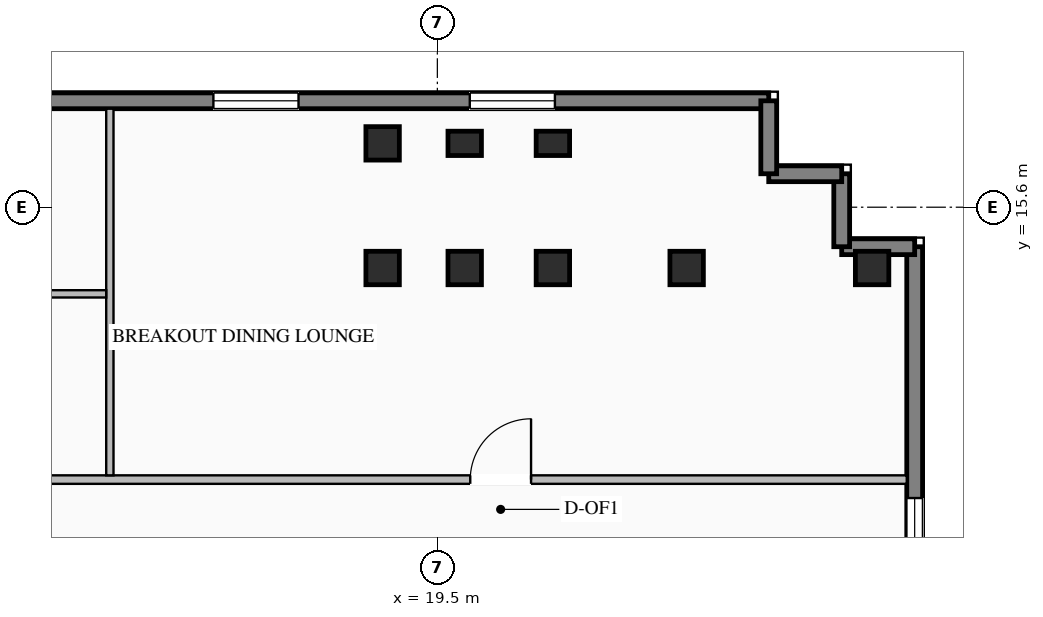
"""IFC4 building model, lengths in metres.
Left out: names, types, materials, properties, quantities, classifications, styles, units other than length and angle.
Written with IfcOpenShell. Run it as: python <this file> out.ifc"""

import sys

from ifc_helpers import new_model, si_unit, direction, frame, frame_2d, origin, origin_2d, place, context, subcontext, project, spatial, rectangle, i_section, extrude, element, fill, save


model = new_model("IFC4")
c1 = context("Model", 3, precision=1e-05, world=origin(), true_north=direction((0.0, 1.0)))
c2 = subcontext(c1, "Body", "Model", "MODEL_VIEW")
j1 = project(units=[si_unit("LENGTHUNIT", "METRE"), si_unit("PLANEANGLEUNIT", "RADIAN")], contexts=[c1])
p1 = place(None, origin())
s1 = spatial("IfcSite", under=j1, at=p1, CompositionType="ELEMENT")
p2 = place(p1, origin())
s2 = spatial("IfcBuilding", under=s1, at=p2, CompositionType="ELEMENT")
p3 = place(p2, frame((0.0, 0.0, 229.2)))
s3 = spatial("IfcBuildingStorey", under=s2, at=p3, CompositionType="ELEMENT", Elevation=229.2)
for number, where, z_axis, x_axis in (
    (1, (18.6, 14.6, 0.0), (0.0, 0.0, 1.0), (1.0, 0.0, 0.0)),
    (2, (19.95, 14.6, 0.0), (0.0, 0.0, 1.0), (1.0, 0.0, 0.0)),
    (3, (21.4, 14.6, 0.0), (0.0, 0.0, 1.0), (1.0, 0.0, 0.0)),
    (4, (23.6, 14.6, 0.0), (0.0, 0.0, 1.0), (1.0, 0.0, 0.0)),
    (5, (18.6, 16.65, 0.0), (0.0, 0.0, 1.0), (1.0, 0.0, 0.0)),
    (6, (26.65, 14.6, 0.0), (0.0, 0.0, 1.0), (1.0, 0.0, 0.0)),
):
    element("IfcColumn", number, at=place(p3, frame(where, z_axis=z_axis, x_axis=x_axis)), inside=s3, PredefinedType="COLUMN", context=c2, shape_type="SweptSolid", body=[
        extrude(i_section(OverallWidth=0.55, OverallDepth=0.55, WebThickness=0.024, FlangeThickness=0.036, at=origin_2d()), origin(), (0.0, 0.0, 1.0), 3.45),
    ])
for number, where, z_axis, x_axis in (
    (7, (19.95, 16.65, 0.0), (0.0, 0.0, 1.0), (1.0, 0.0, 0.0)),
    (8, (21.4, 16.65, 0.0), (0.0, 0.0, 1.0), (1.0, 0.0, 0.0)),
):
    element("IfcColumn", number, at=place(p3, frame(where, z_axis=z_axis, x_axis=x_axis)), inside=s3, PredefinedType="PILASTER", context=c2, shape_type="SweptSolid", body=[
        extrude(rectangle(XDim=0.55, YDim=0.4, at=origin_2d()), origin(), (0.0, 0.0, 1.0), 3.45),
    ])
p4 = place(p3, frame((12.3, 17.35, 0.0), z_axis=(0.0, 0.0, 1.0), x_axis=(1.0, 0.0, 0.0)))
e9 = element("IfcWall", 9, at=p4, inside=s3, PredefinedType="STANDARD", context=c2, shape_type="SweptSolid", body=[
    extrude(rectangle(XDim=12.65, YDim=0.26, at=frame_2d((6.325, 0.0))), origin(), (0.0, 0.0, 1.0), 3.25),
])
p5 = place(p4, frame((3.517, 0.0, 0.76)))
e10 = element("IfcOpeningElement", 10, at=p5, cuts=e9, PredefinedType="OPENING", context=c2, shape_type="SweptSolid", body=[
    extrude(rectangle(XDim=1.4, YDim=1.95, at=frame_2d((0.7, 0.975))), frame((0.0, 0.14, 0.0), z_axis=(0.0, -1.0, 0.0), x_axis=(1.0, 0.0, 0.0)), (0.0, 0.0, 1.0), 0.28),
])
p6 = place(p4, frame((7.733, 0.0, 0.76)))
e11 = element("IfcOpeningElement", 11, at=p6, cuts=e9, PredefinedType="OPENING", context=c2, shape_type="SweptSolid", body=[
    extrude(rectangle(XDim=1.4, YDim=1.95, at=frame_2d((0.7, 0.975))), frame((0.0, 0.14, 0.0), z_axis=(0.0, -1.0, 0.0), x_axis=(1.0, 0.0, 0.0)), (0.0, 0.0, 1.0), 0.28),
])
p7 = place(p3, frame((27.35, 14.95, 0.0), z_axis=(0.0, 0.0, 1.0), x_axis=(0.0, -1.0, 0.0)))
e12 = element("IfcWall", 12, at=p7, inside=s3, PredefinedType="STANDARD", context=c2, shape_type="SweptSolid", body=[
    extrude(rectangle(XDim=15.85, YDim=0.26, at=frame_2d((7.925, 0.0))), origin(), (0.0, 0.0, 1.0), 3.25),
])
p8 = place(p7, frame((4.133, 0.0, 0.76)))
e13 = element("IfcOpeningElement", 13, at=p8, cuts=e12, PredefinedType="OPENING", context=c2, shape_type="SweptSolid", body=[
    extrude(rectangle(XDim=1.2, YDim=1.95, at=frame_2d((0.6, 0.975))), frame((0.0, 0.14, 0.0), z_axis=(0.0, -1.0, 0.0), x_axis=(1.0, 0.0, 0.0)), (0.0, 0.0, 1.0), 0.28),
])
p9 = place(p7, frame((9.967, 0.0, 0.76)))
e14 = element("IfcOpeningElement", 14, at=p9, cuts=e12, PredefinedType="OPENING", context=c2, shape_type="SweptSolid", body=[
    extrude(rectangle(XDim=1.2, YDim=1.95, at=frame_2d((0.6, 0.975))), frame((0.0, 0.14, 0.0), z_axis=(0.0, -1.0, 0.0), x_axis=(1.0, 0.0, 0.0)), (0.0, 0.0, 1.0), 0.28),
])
p10 = place(p3, frame((27.35, 14.95, 0.0), z_axis=(0.0, 0.0, 1.0), x_axis=(-1.0, 0.0, 0.0)))
e15 = element("IfcWall", 15, at=p10, inside=s3, PredefinedType="STANDARD", context=c2, shape_type="SweptSolid", body=[
    extrude(rectangle(XDim=1.2, YDim=0.26, at=frame_2d((0.6, 0.0))), origin(), (0.0, 0.0, 1.0), 2.565),
])
for number, where, z_axis, x_axis in (
    (16, (26.15, 14.95, 0.0), (0.0, 0.0, 1.0), (0.0, 1.0, 0.0)),
    (17, (26.15, 16.15, 0.0), (0.0, 0.0, 1.0), (-1.0, 0.0, 0.0)),
):
    element("IfcWall", number, at=place(p3, frame(where, z_axis=z_axis, x_axis=x_axis)), inside=s3, PredefinedType="STANDARD", context=c2, shape_type="SweptSolid", body=[
        extrude(rectangle(XDim=1.2, YDim=0.26, at=frame_2d((0.6, 0.0))), origin(), (0.0, 0.0, 1.0), 2.565),
    ])
p11 = place(p3, frame((24.95, 16.15, 0.0), z_axis=(0.0, 0.0, 1.0), x_axis=(0.0, 1.0, 0.0)))
e18 = element("IfcWall", 18, at=p11, inside=s3, PredefinedType="STANDARD", context=c2, shape_type="SweptSolid", body=[
    extrude(rectangle(XDim=1.2, YDim=0.26, at=frame_2d((0.6, 0.0))), origin(), (0.0, 0.0, 1.0), 2.565),
])
p12 = place(p3, frame((-29.62, 11.12, 0.0), z_axis=(0.0, 0.0, 1.0), x_axis=(1.0, 0.0, 0.0)))
e19 = element("IfcWall", 19, at=p12, inside=s3, PredefinedType="STANDARD", context=c2, shape_type="SweptSolid", body=[
    extrude(rectangle(XDim=56.84, YDim=0.14, at=frame_2d((28.42, 0.0))), origin(), (0.0, 0.0, 1.0), 3.25),
])
p13 = place(p12, frame((6.179, 0.0, 0.0)))
e20 = element("IfcOpeningElement", 20, at=p13, cuts=e19, PredefinedType="OPENING", context=c2, shape_type="SweptSolid", body=[
    extrude(rectangle(XDim=1.0, YDim=2.08, at=frame_2d((0.5, 1.04))), frame((0.0, 0.08, 0.0), z_axis=(0.0, -1.0, 0.0), x_axis=(1.0, 0.0, 0.0)), (0.0, 0.0, 1.0), 0.16),
])
p14 = place(p12, frame((20.263, 0.0, 0.0)))
e21 = element("IfcOpeningElement", 21, at=p14, cuts=e19, PredefinedType="OPENING", context=c2, shape_type="SweptSolid", body=[
    extrude(rectangle(XDim=1.0, YDim=2.08, at=frame_2d((0.5, 1.04))), frame((0.0, 0.08, 0.0), z_axis=(0.0, -1.0, 0.0), x_axis=(1.0, 0.0, 0.0)), (0.0, 0.0, 1.0), 0.16),
])
p15 = place(p12, frame((35.577, 0.0, 0.0)))
e22 = element("IfcOpeningElement", 22, at=p15, cuts=e19, PredefinedType="OPENING", context=c2, shape_type="SweptSolid", body=[
    extrude(rectangle(XDim=1.0, YDim=2.08, at=frame_2d((0.5, 1.04))), frame((0.0, 0.08, 0.0), z_axis=(0.0, -1.0, 0.0), x_axis=(1.0, 0.0, 0.0)), (0.0, 0.0, 1.0), 0.16),
])
p16 = place(p12, frame((49.661, 0.0, 0.0)))
e23 = element("IfcOpeningElement", 23, at=p16, cuts=e19, PredefinedType="OPENING", context=c2, shape_type="SweptSolid", body=[
    extrude(rectangle(XDim=1.0, YDim=2.08, at=frame_2d((0.5, 1.04))), frame((0.0, 0.08, 0.0), z_axis=(0.0, -1.0, 0.0), x_axis=(1.0, 0.0, 0.0)), (0.0, 0.0, 1.0), 0.16),
])
p17 = place(p3, frame((14.114, 11.19, 0.0), z_axis=(0.0, 0.0, 1.0), x_axis=(0.0, 1.0, 0.0)))
e24 = element("IfcWall", 24, at=p17, inside=s3, PredefinedType="STANDARD", context=c2, shape_type="SweptSolid", body=[
    extrude(rectangle(XDim=6.03, YDim=0.12, at=frame_2d((3.015, 0.0))), origin(), (0.0, 0.0, 1.0), 3.25),
])
p18 = place(p3, frame((-16.454, 14.175, 0.0), z_axis=(0.0, 0.0, 1.0), x_axis=(1.0, 0.0, 0.0)))
e25 = element("IfcWall", 25, at=p18, inside=s3, PredefinedType="STANDARD", context=c2, shape_type="SweptSolid", body=[
    extrude(rectangle(XDim=30.508, YDim=0.12, at=frame_2d((15.254, 0.0))), origin(), (0.0, 0.0, 1.0), 3.25),
])
p19 = place(p18, frame((0.32, 0.0, 0.0)))
e26 = element("IfcOpeningElement", 26, at=p19, cuts=e25, PredefinedType="OPENING", context=c2, shape_type="SweptSolid", body=[
    extrude(rectangle(XDim=1.0, YDim=2.08, at=frame_2d((0.5, 1.04))), frame((0.0, 0.07, 0.0), z_axis=(0.0, -1.0, 0.0), x_axis=(1.0, 0.0, 0.0)), (0.0, 0.0, 1.0), 0.14),
])
p20 = place(p18, frame((22.254, 0.0, 0.0)))
e27 = element("IfcOpeningElement", 27, at=p20, cuts=e25, PredefinedType="OPENING", context=c2, shape_type="SweptSolid", body=[
    extrude(rectangle(XDim=1.0, YDim=2.08, at=frame_2d((0.5, 1.04))), frame((0.0, 0.07, 0.0), z_axis=(0.0, -1.0, 0.0), x_axis=(1.0, 0.0, 0.0)), (0.0, 0.0, 1.0), 0.14),
])
p21 = place(p5, origin())
e28 = element("IfcWindow", 28, at=p21, inside=s3, PartitioningType="SINGLE_PANEL", PredefinedType="WINDOW", context=c2, shape_type="SweptSolid", body=[
    extrude(rectangle(XDim=1.4, YDim=1.95, at=frame_2d((0.7, 0.975))), frame((0.0, 0.03, 0.0), z_axis=(0.0, -1.0, 0.0), x_axis=(1.0, 0.0, 0.0)), (0.0, 0.0, 1.0), 0.06),
])
fill(e10, e28)
p22 = place(p6, origin())
e29 = element("IfcWindow", 29, at=p22, inside=s3, PartitioningType="SINGLE_PANEL", PredefinedType="WINDOW", context=c2, shape_type="SweptSolid", body=[
    extrude(rectangle(XDim=1.4, YDim=1.95, at=frame_2d((0.7, 0.975))), frame((0.0, 0.03, 0.0), z_axis=(0.0, -1.0, 0.0), x_axis=(1.0, 0.0, 0.0)), (0.0, 0.0, 1.0), 0.06),
])
fill(e11, e29)
p23 = place(p8, origin())
e30 = element("IfcWindow", 30, at=p23, inside=s3, PartitioningType="SINGLE_PANEL", PredefinedType="WINDOW", context=c2, shape_type="SweptSolid", body=[
    extrude(rectangle(XDim=1.2, YDim=1.95, at=frame_2d((0.6, 0.975))), frame((0.0, 0.03, 0.0), z_axis=(0.0, -1.0, 0.0), x_axis=(1.0, 0.0, 0.0)), (0.0, 0.0, 1.0), 0.06),
])
fill(e13, e30)
p24 = place(p16, origin())
e31 = element("IfcDoor", 31, at=p24, inside=s3, OperationType="SINGLE_SWING_RIGHT", PredefinedType="DOOR", context=c2, shape_type="SweptSolid", body=[
    extrude(rectangle(XDim=1.0, YDim=2.08, at=frame_2d((0.5, 1.04))), frame((0.0, 0.025, 0.0), z_axis=(0.0, -1.0, 0.0), x_axis=(1.0, 0.0, 0.0)), (0.0, 0.0, 1.0), 0.05),
])
fill(e23, e31)
save(model, sys.argv[1])
